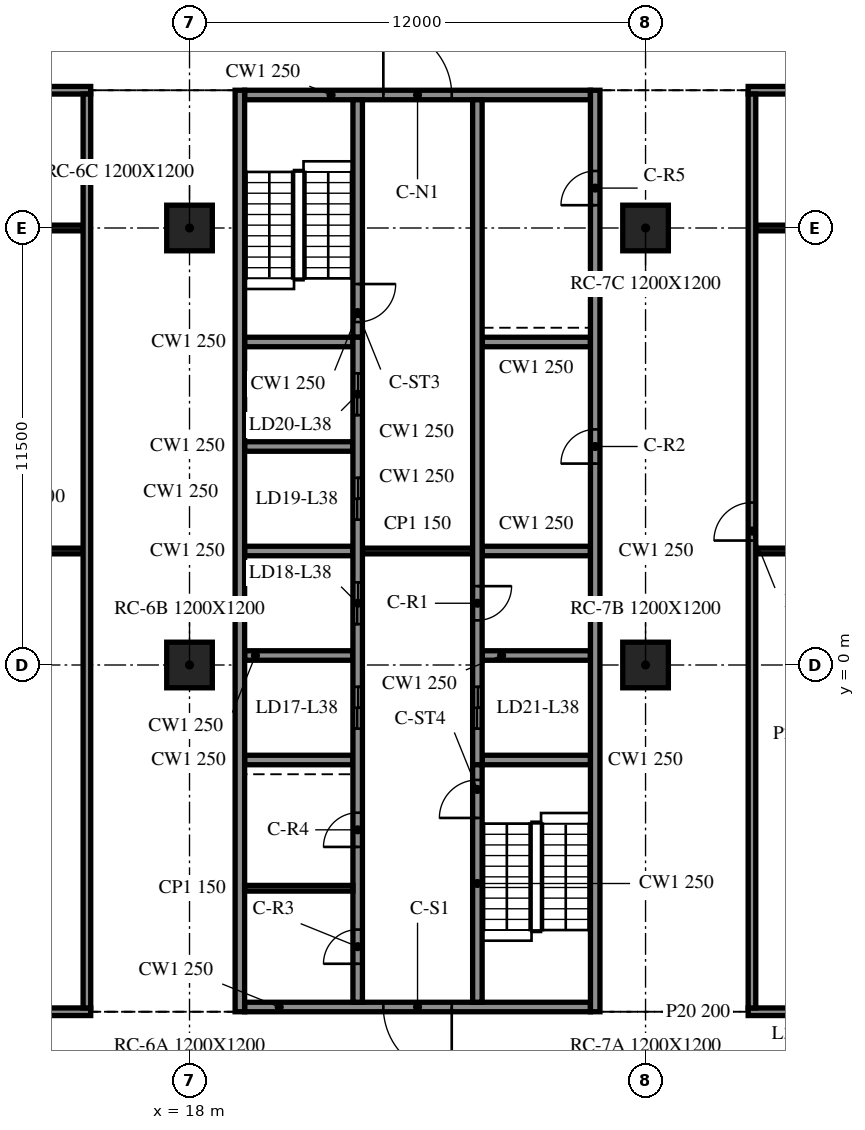
"""IFC4 building model, lengths in metres.
Left out: names, types, materials, properties, quantities, classifications, styles, units other than length and angle.
Written with IfcOpenShell. Run it as: python <this file> out.ifc"""

import sys

from ifc_helpers import new_model, si_unit, direction, frame, frame_2d, origin, origin_2d, place, context, subcontext, project, spatial, rectangle, extrude, element, fill, save


model = new_model("IFC4")
c1 = context("Model", 3, precision=1e-05, world=origin(), true_north=direction((0.0, 1.0)))
c2 = subcontext(c1, "Body", "Model", "MODEL_VIEW")
j1 = project(units=[si_unit("LENGTHUNIT", "METRE"), si_unit("PLANEANGLEUNIT", "RADIAN")], contexts=[c1])
p1 = place(None, origin())
s1 = spatial("IfcSite", under=j1, at=p1, CompositionType="ELEMENT")
p2 = place(p1, origin())
s2 = spatial("IfcBuilding", under=s1, at=p2, CompositionType="ELEMENT")
p3 = place(p2, frame((0.0, 0.0, 163.0)))
s3 = spatial("IfcBuildingStorey", under=s2, at=p3, CompositionType="ELEMENT", Elevation=163.0)
for number, where, z_axis, x_axis in (
    (1, (18.0, 0.0, -0.34), (0.0, 0.0, 1.0), (1.0, 0.0, 0.0)),
    (2, (18.0, 11.5, -0.34), (0.0, 0.0, 1.0), (1.0, 0.0, 0.0)),
    (3, (30.0, 0.0, -0.34), (0.0, 0.0, 1.0), (1.0, 0.0, 0.0)),
    (4, (30.0, 11.5, -0.34), (0.0, 0.0, 1.0), (1.0, 0.0, 0.0)),
):
    element("IfcColumn", number, at=place(p3, frame(where, z_axis=z_axis, x_axis=x_axis)), inside=s3, PredefinedType="COLUMN", context=c2, shape_type="SweptSolid", body=[
        extrude(rectangle(XDim=1.2, YDim=1.2, at=origin_2d()), origin(), (0.0, 0.0, 1.0), 3.8),
    ])
p4 = place(p3, frame((19.325, 15.125, 0.0), z_axis=(0.0, 0.0, 1.0), x_axis=(0.0, -1.0, 0.0)))
e5 = element("IfcWall", 5, at=p4, inside=s3, PredefinedType="SOLIDWALL", context=c2, shape_type="SweptSolid", body=[
    extrude(rectangle(XDim=24.25, YDim=0.25, at=frame_2d((12.125, 0.0))), origin(), (0.0, 0.0, 1.0), 3.46),
])
p5 = place(p3, frame((28.675, -9.125, 0.0), z_axis=(0.0, 0.0, 1.0), x_axis=(0.0, 1.0, 0.0)))
e6 = element("IfcWall", 6, at=p5, inside=s3, PredefinedType="SOLIDWALL", context=c2, shape_type="SweptSolid", body=[
    extrude(rectangle(XDim=24.25, YDim=0.25, at=frame_2d((12.125, 0.0))), origin(), (0.0, 0.0, 1.0), 3.46),
])
p6 = place(p5, frame((14.425, 0.0, 0.0)))
e7 = element("IfcOpeningElement", 7, at=p6, cuts=e6, PredefinedType="OPENING", context=c2, shape_type="SweptSolid", body=[
    extrude(rectangle(XDim=0.9, YDim=2.1, at=frame_2d((0.45, 1.05))), frame((0.0, 0.135, 0.0), z_axis=(0.0, -1.0, 0.0), x_axis=(1.0, 0.0, 0.0)), (0.0, 0.0, 1.0), 0.27),
])
p7 = place(p5, frame((21.225, 0.0, 0.0)))
e8 = element("IfcOpeningElement", 8, at=p7, cuts=e6, PredefinedType="OPENING", context=c2, shape_type="SweptSolid", body=[
    extrude(rectangle(XDim=0.9, YDim=2.1, at=frame_2d((0.45, 1.05))), frame((0.0, 0.135, 0.0), z_axis=(0.0, -1.0, 0.0), x_axis=(1.0, 0.0, 0.0)), (0.0, 0.0, 1.0), 0.27),
])
p8 = place(p3, frame((28.55, -9.0, 0.0), z_axis=(0.0, 0.0, 1.0), x_axis=(-1.0, 0.0, 0.0)))
e9 = element("IfcWall", 9, at=p8, inside=s3, PredefinedType="SOLIDWALL", context=c2, shape_type="SweptSolid", body=[
    extrude(rectangle(XDim=9.1, YDim=0.25, at=frame_2d((4.55, 0.0))), origin(), (0.0, 0.0, 1.0), 3.46),
])
p9 = place(p8, frame((3.65, 0.0, 0.0)))
e10 = element("IfcOpeningElement", 10, at=p9, cuts=e9, PredefinedType="OPENING", context=c2, shape_type="SweptSolid", body=[
    extrude(rectangle(XDim=1.8, YDim=2.1, at=frame_2d((0.9, 1.05))), frame((0.0, 0.135, 0.0), z_axis=(0.0, -1.0, 0.0), x_axis=(1.0, 0.0, 0.0)), (0.0, 0.0, 1.0), 0.27),
])
p10 = place(p3, frame((19.45, 15.0, 0.0), z_axis=(0.0, 0.0, 1.0), x_axis=(1.0, 0.0, 0.0)))
e11 = element("IfcWall", 11, at=p10, inside=s3, PredefinedType="SOLIDWALL", context=c2, shape_type="SweptSolid", body=[
    extrude(rectangle(XDim=9.1, YDim=0.25, at=frame_2d((4.55, 0.0))), origin(), (0.0, 0.0, 1.0), 3.46),
])
p11 = place(p10, frame((3.65, 0.0, 0.0)))
e12 = element("IfcOpeningElement", 12, at=p11, cuts=e11, PredefinedType="OPENING", context=c2, shape_type="SweptSolid", body=[
    extrude(rectangle(XDim=1.8, YDim=2.1, at=frame_2d((0.9, 1.05))), frame((0.0, 0.135, 0.0), z_axis=(0.0, -1.0, 0.0), x_axis=(1.0, 0.0, 0.0)), (0.0, 0.0, 1.0), 0.27),
])
p12 = place(p3, frame((22.425, -8.875, 0.0), z_axis=(0.0, 0.0, 1.0), x_axis=(0.0, 1.0, 0.0)))
e13 = element("IfcWall", 13, at=p12, inside=s3, PredefinedType="SOLIDWALL", context=c2, shape_type="SweptSolid", body=[
    extrude(rectangle(XDim=17.5, YDim=0.25, at=frame_2d((8.75, 0.0))), origin(), (0.0, 0.0, 1.0), 3.46),
])
p13 = place(p12, frame((7.2, 0.0, 0.0)))
e14 = element("IfcOpeningElement", 14, at=p13, cuts=e13, PredefinedType="OPENING", context=c2, shape_type="SweptSolid", body=[
    extrude(rectangle(XDim=1.1, YDim=2.1, at=frame_2d((0.55, 1.05))), frame((0.0, 0.135, 0.0), z_axis=(0.0, -1.0, 0.0), x_axis=(1.0, 0.0, 0.0)), (0.0, 0.0, 1.0), 0.27),
])
p14 = place(p12, frame((9.95, 0.0, 0.0)))
e15 = element("IfcOpeningElement", 15, at=p14, cuts=e13, PredefinedType="OPENING", context=c2, shape_type="SweptSolid", body=[
    extrude(rectangle(XDim=1.1, YDim=2.1, at=frame_2d((0.55, 1.05))), frame((0.0, 0.135, 0.0), z_axis=(0.0, -1.0, 0.0), x_axis=(1.0, 0.0, 0.0)), (0.0, 0.0, 1.0), 0.27),
])
p15 = place(p12, frame((12.7, 0.0, 0.0)))
e16 = element("IfcOpeningElement", 16, at=p15, cuts=e13, PredefinedType="OPENING", context=c2, shape_type="SweptSolid", body=[
    extrude(rectangle(XDim=1.1, YDim=2.1, at=frame_2d((0.55, 1.05))), frame((0.0, 0.135, 0.0), z_axis=(0.0, -1.0, 0.0), x_axis=(1.0, 0.0, 0.0)), (0.0, 0.0, 1.0), 0.27),
])
p16 = place(p12, frame((15.45, 0.0, 0.0)))
e17 = element("IfcOpeningElement", 17, at=p16, cuts=e13, PredefinedType="OPENING", context=c2, shape_type="SweptSolid", body=[
    extrude(rectangle(XDim=1.1, YDim=2.1, at=frame_2d((0.55, 1.05))), frame((0.0, 0.135, 0.0), z_axis=(0.0, -1.0, 0.0), x_axis=(1.0, 0.0, 0.0)), (0.0, 0.0, 1.0), 0.27),
])
p17 = place(p12, frame((1.012, 0.0, 0.0)))
e18 = element("IfcOpeningElement", 18, at=p17, cuts=e13, PredefinedType="OPENING", context=c2, shape_type="SweptSolid", body=[
    extrude(rectangle(XDim=0.9, YDim=2.1, at=frame_2d((0.45, 1.05))), frame((0.0, 0.135, 0.0), z_axis=(0.0, -1.0, 0.0), x_axis=(1.0, 0.0, 0.0)), (0.0, 0.0, 1.0), 0.27),
])
p18 = place(p12, frame((4.087, 0.0, 0.0)))
e19 = element("IfcOpeningElement", 19, at=p18, cuts=e13, PredefinedType="OPENING", context=c2, shape_type="SweptSolid", body=[
    extrude(rectangle(XDim=0.9, YDim=2.1, at=frame_2d((0.45, 1.05))), frame((0.0, 0.135, 0.0), z_axis=(0.0, -1.0, 0.0), x_axis=(1.0, 0.0, 0.0)), (0.0, 0.0, 1.0), 0.27),
])
p19 = place(p3, frame((22.425, 14.875, 0.0), z_axis=(0.0, 0.0, 1.0), x_axis=(0.0, -1.0, 0.0)))
e20 = element("IfcWall", 20, at=p19, inside=s3, PredefinedType="SOLIDWALL", context=c2, shape_type="SweptSolid", body=[
    extrude(rectangle(XDim=6.25, YDim=0.25, at=frame_2d((3.125, 0.0))), origin(), (0.0, 0.0, 1.0), 3.46),
])
p20 = place(p19, frame((4.85, 0.0, 0.0)))
e21 = element("IfcOpeningElement", 21, at=p20, cuts=e20, PredefinedType="OPENING", context=c2, shape_type="SweptSolid", body=[
    extrude(rectangle(XDim=1.0, YDim=2.1, at=frame_2d((0.5, 1.05))), frame((0.0, 0.135, 0.0), z_axis=(0.0, -1.0, 0.0), x_axis=(1.0, 0.0, 0.0)), (0.0, 0.0, 1.0), 0.27),
])
p21 = place(p3, frame((25.575, -8.875, 0.0), z_axis=(0.0, 0.0, 1.0), x_axis=(0.0, 1.0, 0.0)))
e22 = element("IfcWall", 22, at=p21, inside=s3, PredefinedType="SOLIDWALL", context=c2, shape_type="SweptSolid", body=[
    extrude(rectangle(XDim=6.25, YDim=0.25, at=frame_2d((3.125, 0.0))), origin(), (0.0, 0.0, 1.0), 3.46),
])
p22 = place(p21, frame((4.85, 0.0, 0.0)))
e23 = element("IfcOpeningElement", 23, at=p22, cuts=e22, PredefinedType="OPENING", context=c2, shape_type="SweptSolid", body=[
    extrude(rectangle(XDim=1.0, YDim=2.1, at=frame_2d((0.5, 1.05))), frame((0.0, 0.135, 0.0), z_axis=(0.0, -1.0, 0.0), x_axis=(1.0, 0.0, 0.0)), (0.0, 0.0, 1.0), 0.27),
])
p23 = place(p3, frame((25.575, 14.875, 0.0), z_axis=(0.0, 0.0, 1.0), x_axis=(0.0, -1.0, 0.0)))
e24 = element("IfcWall", 24, at=p23, inside=s3, PredefinedType="SOLIDWALL", context=c2, shape_type="SweptSolid", body=[
    extrude(rectangle(XDim=17.5, YDim=0.25, at=frame_2d((8.75, 0.0))), origin(), (0.0, 0.0, 1.0), 3.46),
])
p24 = place(p23, frame((15.45, 0.0, 0.0)))
e25 = element("IfcOpeningElement", 25, at=p24, cuts=e24, PredefinedType="OPENING", context=c2, shape_type="SweptSolid", body=[
    extrude(rectangle(XDim=1.1, YDim=2.1, at=frame_2d((0.55, 1.05))), frame((0.0, 0.135, 0.0), z_axis=(0.0, -1.0, 0.0), x_axis=(1.0, 0.0, 0.0)), (0.0, 0.0, 1.0), 0.27),
])
p25 = place(p23, frame((12.8, 0.0, 0.0)))
e26 = element("IfcOpeningElement", 26, at=p25, cuts=e24, PredefinedType="OPENING", context=c2, shape_type="SweptSolid", body=[
    extrude(rectangle(XDim=0.9, YDim=2.1, at=frame_2d((0.45, 1.05))), frame((0.0, 0.135, 0.0), z_axis=(0.0, -1.0, 0.0), x_axis=(1.0, 0.0, 0.0)), (0.0, 0.0, 1.0), 0.27),
])
for number, where, z_axis, x_axis in (
    (27, (19.45, -2.5, 0.0), (0.0, 0.0, 1.0), (1.0, 0.0, 0.0)),
    (28, (19.45, 0.25, 0.0), (0.0, 0.0, 1.0), (1.0, 0.0, 0.0)),
    (29, (19.45, 3.0, 0.0), (0.0, 0.0, 1.0), (1.0, 0.0, 0.0)),
    (30, (19.45, 5.75, 0.0), (0.0, 0.0, 1.0), (1.0, 0.0, 0.0)),
    (31, (19.45, 8.5, 0.0), (0.0, 0.0, 1.0), (1.0, 0.0, 0.0)),
    (32, (25.7, -2.5, 0.0), (0.0, 0.0, 1.0), (1.0, 0.0, 0.0)),
    (33, (25.7, 0.25, 0.0), (0.0, 0.0, 1.0), (1.0, 0.0, 0.0)),
    (34, (25.7, 3.0, 0.0), (0.0, 0.0, 1.0), (1.0, 0.0, 0.0)),
    (35, (25.7, 8.5, 0.0), (0.0, 0.0, 1.0), (1.0, 0.0, 0.0)),
):
    element("IfcWall", number, at=place(p3, frame(where, z_axis=z_axis, x_axis=x_axis)), inside=s3, PredefinedType="SOLIDWALL", context=c2, shape_type="SweptSolid", body=[
        extrude(rectangle(XDim=2.85, YDim=0.25, at=frame_2d((1.425, 0.0))), origin(), (0.0, 0.0, 1.0), 3.46),
    ])
p26 = place(p3, frame((22.55, 3.0, 0.0), z_axis=(0.0, 0.0, 1.0), x_axis=(1.0, 0.0, 0.0)))
e36 = element("IfcWall", 36, at=p26, inside=s3, PredefinedType="PARTITIONING", context=c2, shape_type="SweptSolid", body=[
    extrude(rectangle(XDim=2.9, YDim=0.15, at=frame_2d((1.45, 0.0))), origin(), (0.0, 0.0, 1.0), 3.46),
])
p27 = place(p3, frame((19.45, -5.875, 0.0), z_axis=(0.0, 0.0, 1.0), x_axis=(1.0, 0.0, 0.0)))
e37 = element("IfcWall", 37, at=p27, inside=s3, PredefinedType="PARTITIONING", context=c2, shape_type="SweptSolid", body=[
    extrude(rectangle(XDim=2.85, YDim=0.15, at=frame_2d((1.425, 0.0))), origin(), (0.0, 0.0, 1.0), 3.46),
])
p28 = place(p3, frame((8.5, -9.125, 0.0), z_axis=(0.0, 0.0, 1.0), x_axis=(1.0, 0.0, 0.0)))
e38 = element("IfcWall", 38, at=p28, inside=s3, PredefinedType="PARTITIONING", context=c2, shape_type="SweptSolid", body=[
    extrude(rectangle(XDim=6.9, YDim=0.2, at=frame_2d((3.45, 0.0))), origin(), (0.0, 0.0, 1.0), 3.46),
])
p29 = place(p28, frame((2.9, 0.0, 0.0)))
e39 = element("IfcOpeningElement", 39, at=p29, cuts=e38, PredefinedType="OPENING", context=c2, shape_type="SweptSolid", body=[
    extrude(rectangle(XDim=0.9, YDim=2.1, at=frame_2d((0.45, 1.05))), frame((0.0, 0.11, 0.0), z_axis=(0.0, -1.0, 0.0), x_axis=(1.0, 0.0, 0.0)), (0.0, 0.0, 1.0), 0.22),
])
p30 = place(p3, frame((32.7, -9.125, 0.0), z_axis=(0.0, 0.0, 1.0), x_axis=(1.0, 0.0, 0.0)))
e40 = element("IfcWall", 40, at=p30, inside=s3, PredefinedType="PARTITIONING", context=c2, shape_type="SweptSolid", body=[
    extrude(rectangle(XDim=15.275, YDim=0.2, at=frame_2d((7.638, 0.0))), origin(), (0.0, 0.0, 1.0), 3.46),
])
p31 = place(p30, frame((6.9, 0.0, 0.0)))
e41 = element("IfcOpeningElement", 41, at=p31, cuts=e40, PredefinedType="OPENING", context=c2, shape_type="SweptSolid", body=[
    extrude(rectangle(XDim=1.2, YDim=2.1, at=frame_2d((0.6, 1.05))), frame((0.0, 0.11, 0.0), z_axis=(0.0, -1.0, 0.0), x_axis=(1.0, 0.0, 0.0)), (0.0, 0.0, 1.0), 0.22),
])
p32 = place(p3, frame((8.7, 3.0, 0.0), z_axis=(0.0, 0.0, 1.0), x_axis=(1.0, 0.0, 0.0)))
e42 = element("IfcWall", 42, at=p32, inside=s3, PredefinedType="PARTITIONING", context=c2, shape_type="SweptSolid", body=[
    extrude(rectangle(XDim=6.5, YDim=0.15, at=frame_2d((3.25, 0.0))), origin(), (0.0, 0.0, 1.0), 3.46),
])
p33 = place(p3, frame((32.9, 3.0, 0.0), z_axis=(0.0, 0.0, 1.0), x_axis=(1.0, 0.0, 0.0)))
e43 = element("IfcWall", 43, at=p33, inside=s3, PredefinedType="PARTITIONING", context=c2, shape_type="SweptSolid", body=[
    extrude(rectangle(XDim=15.075, YDim=0.15, at=frame_2d((7.538, 0.0))), origin(), (0.0, 0.0, 1.0), 3.46),
])
p34 = place(p3, frame((8.7, 11.5, 0.0), z_axis=(0.0, 0.0, 1.0), x_axis=(1.0, 0.0, 0.0)))
e44 = element("IfcWall", 44, at=p34, inside=s3, PredefinedType="PARTITIONING", context=c2, shape_type="SweptSolid", body=[
    extrude(rectangle(XDim=6.5, YDim=0.15, at=frame_2d((3.25, 0.0))), origin(), (0.0, 0.0, 1.0), 3.46),
])
p35 = place(p3, frame((32.9, 11.5, 0.0), z_axis=(0.0, 0.0, 1.0), x_axis=(1.0, 0.0, 0.0)))
e45 = element("IfcWall", 45, at=p35, inside=s3, PredefinedType="PARTITIONING", context=c2, shape_type="SweptSolid", body=[
    extrude(rectangle(XDim=8.5, YDim=0.15, at=frame_2d((4.25, 0.0))), origin(), (0.0, 0.0, 1.0), 3.46),
])
p36 = place(p3, frame((8.5, 15.125, 0.0), z_axis=(0.0, 0.0, 1.0), x_axis=(1.0, 0.0, 0.0)))
e46 = element("IfcWall", 46, at=p36, inside=s3, PredefinedType="PARTITIONING", context=c2, shape_type="SweptSolid", body=[
    extrude(rectangle(XDim=6.9, YDim=0.2, at=frame_2d((3.45, 0.0))), origin(), (0.0, 0.0, 1.0), 3.46),
])
p37 = place(p36, frame((2.9, 0.0, 0.0)))
e47 = element("IfcOpeningElement", 47, at=p37, cuts=e46, PredefinedType="OPENING", context=c2, shape_type="SweptSolid", body=[
    extrude(rectangle(XDim=0.9, YDim=2.1, at=frame_2d((0.45, 1.05))), frame((0.0, 0.11, 0.0), z_axis=(0.0, -1.0, 0.0), x_axis=(1.0, 0.0, 0.0)), (0.0, 0.0, 1.0), 0.22),
])
p38 = place(p3, frame((32.7, 15.125, 0.0), z_axis=(0.0, 0.0, 1.0), x_axis=(1.0, 0.0, 0.0)))
e48 = element("IfcWall", 48, at=p38, inside=s3, PredefinedType="PARTITIONING", context=c2, shape_type="SweptSolid", body=[
    extrude(rectangle(XDim=15.275, YDim=0.2, at=frame_2d((7.638, 0.0))), origin(), (0.0, 0.0, 1.0), 3.46),
])
p39 = place(p38, frame((7.1, 0.0, 0.0)))
e49 = element("IfcOpeningElement", 49, at=p39, cuts=e48, PredefinedType="OPENING", context=c2, shape_type="SweptSolid", body=[
    extrude(rectangle(XDim=1.0, YDim=2.1, at=frame_2d((0.5, 1.05))), frame((0.0, 0.11, 0.0), z_axis=(0.0, -1.0, 0.0), x_axis=(1.0, 0.0, 0.0)), (0.0, 0.0, 1.0), 0.22),
])
p40 = place(p3, frame((15.3, -9.025, 0.0), z_axis=(0.0, 0.0, 1.0), x_axis=(0.0, 1.0, 0.0)))
e50 = element("IfcWall", 50, at=p40, inside=s3, PredefinedType="PARTITIONING", context=c2, shape_type="SweptSolid", body=[
    extrude(rectangle(XDim=24.05, YDim=0.2, at=frame_2d((12.025, 0.0))), origin(), (0.0, 0.0, 1.0), 3.46),
])
p41 = place(p3, frame((32.8, -9.025, 0.0), z_axis=(0.0, 0.0, 1.0), x_axis=(0.0, 1.0, 0.0)))
e51 = element("IfcWall", 51, at=p41, inside=s3, PredefinedType="PARTITIONING", context=c2, shape_type="SweptSolid", body=[
    extrude(rectangle(XDim=24.05, YDim=0.2, at=frame_2d((12.025, 0.0))), origin(), (0.0, 0.0, 1.0), 3.46),
])
p42 = place(p41, frame((12.3, 0.0, 0.0)))
e52 = element("IfcOpeningElement", 52, at=p42, cuts=e51, PredefinedType="OPENING", context=c2, shape_type="SweptSolid", body=[
    extrude(rectangle(XDim=1.0, YDim=2.1, at=frame_2d((0.5, 1.05))), frame((0.0, 0.11, 0.0), z_axis=(0.0, -1.0, 0.0), x_axis=(1.0, 0.0, 0.0)), (0.0, 0.0, 1.0), 0.22),
])
p43 = place(p9, origin())
e53 = element("IfcDoor", 53, at=p43, inside=s3, OperationType="DOUBLE_DOOR_SINGLE_SWING", PredefinedType="DOOR", context=c2, shape_type="SweptSolid", body=[
    extrude(rectangle(XDim=1.8, YDim=2.1, at=frame_2d((0.9, 1.05))), frame((0.0, 0.025, 0.0), z_axis=(0.0, -1.0, 0.0), x_axis=(1.0, 0.0, 0.0)), (0.0, 0.0, 1.0), 0.05),
])
fill(e10, e53)
p44 = place(p11, origin())
e54 = element("IfcDoor", 54, at=p44, inside=s3, OperationType="DOUBLE_DOOR_SINGLE_SWING", PredefinedType="DOOR", context=c2, shape_type="SweptSolid", body=[
    extrude(rectangle(XDim=1.8, YDim=2.1, at=frame_2d((0.9, 1.05))), frame((0.0, 0.025, 0.0), z_axis=(0.0, -1.0, 0.0), x_axis=(1.0, 0.0, 0.0)), (0.0, 0.0, 1.0), 0.05),
])
fill(e12, e54)
p45 = place(p24, origin())
e55 = element("IfcDoor", 55, at=p45, inside=s3, OperationType="DOUBLE_DOOR_SLIDING", PredefinedType="DOOR", context=c2, shape_type="SweptSolid", body=[
    extrude(rectangle(XDim=1.1, YDim=2.1, at=frame_2d((0.55, 1.05))), frame((0.0, 0.025, 0.0), z_axis=(0.0, -1.0, 0.0), x_axis=(1.0, 0.0, 0.0)), (0.0, 0.0, 1.0), 0.05),
])
fill(e25, e55)
p46 = place(p13, origin())
e56 = element("IfcDoor", 56, at=p46, inside=s3, OperationType="DOUBLE_DOOR_SLIDING", PredefinedType="DOOR", context=c2, shape_type="SweptSolid", body=[
    extrude(rectangle(XDim=1.1, YDim=2.1, at=frame_2d((0.55, 1.05))), frame((0.0, 0.025, 0.0), z_axis=(0.0, -1.0, 0.0), x_axis=(1.0, 0.0, 0.0)), (0.0, 0.0, 1.0), 0.05),
])
fill(e14, e56)
p47 = place(p14, origin())
e57 = element("IfcDoor", 57, at=p47, inside=s3, OperationType="DOUBLE_DOOR_SLIDING", PredefinedType="DOOR", context=c2, shape_type="SweptSolid", body=[
    extrude(rectangle(XDim=1.1, YDim=2.1, at=frame_2d((0.55, 1.05))), frame((0.0, 0.025, 0.0), z_axis=(0.0, -1.0, 0.0), x_axis=(1.0, 0.0, 0.0)), (0.0, 0.0, 1.0), 0.05),
])
fill(e15, e57)
p48 = place(p15, origin())
e58 = element("IfcDoor", 58, at=p48, inside=s3, OperationType="DOUBLE_DOOR_SLIDING", PredefinedType="DOOR", context=c2, shape_type="SweptSolid", body=[
    extrude(rectangle(XDim=1.1, YDim=2.1, at=frame_2d((0.55, 1.05))), frame((0.0, 0.025, 0.0), z_axis=(0.0, -1.0, 0.0), x_axis=(1.0, 0.0, 0.0)), (0.0, 0.0, 1.0), 0.05),
])
fill(e16, e58)
p49 = place(p16, origin())
e59 = element("IfcDoor", 59, at=p49, inside=s3, OperationType="DOUBLE_DOOR_SLIDING", PredefinedType="DOOR", context=c2, shape_type="SweptSolid", body=[
    extrude(rectangle(XDim=1.1, YDim=2.1, at=frame_2d((0.55, 1.05))), frame((0.0, 0.025, 0.0), z_axis=(0.0, -1.0, 0.0), x_axis=(1.0, 0.0, 0.0)), (0.0, 0.0, 1.0), 0.05),
])
fill(e17, e59)
p50 = place(p25, origin())
e60 = element("IfcDoor", 60, at=p50, inside=s3, OperationType="SINGLE_SWING_LEFT", PredefinedType="DOOR", context=c2, shape_type="SweptSolid", body=[
    extrude(rectangle(XDim=0.9, YDim=2.1, at=frame_2d((0.45, 1.05))), frame((0.0, 0.025, 0.0), z_axis=(0.0, -1.0, 0.0), x_axis=(1.0, 0.0, 0.0)), (0.0, 0.0, 1.0), 0.05),
])
fill(e26, e60)
p51 = place(p6, origin())
e61 = element("IfcDoor", 61, at=p51, inside=s3, OperationType="SINGLE_SWING_RIGHT", PredefinedType="DOOR", context=c2, shape_type="SweptSolid", body=[
    extrude(rectangle(XDim=0.9, YDim=2.1, at=frame_2d((0.45, 1.05))), frame((0.0, 0.025, 0.0), z_axis=(0.0, -1.0, 0.0), x_axis=(1.0, 0.0, 0.0)), (0.0, 0.0, 1.0), 0.05),
])
fill(e7, e61)
p52 = place(p17, origin())
e62 = element("IfcDoor", 62, at=p52, inside=s3, OperationType="SINGLE_SWING_LEFT", PredefinedType="DOOR", context=c2, shape_type="SweptSolid", body=[
    extrude(rectangle(XDim=0.9, YDim=2.1, at=frame_2d((0.45, 1.05))), frame((0.0, 0.025, 0.0), z_axis=(0.0, -1.0, 0.0), x_axis=(1.0, 0.0, 0.0)), (0.0, 0.0, 1.0), 0.05),
])
fill(e18, e62)
p53 = place(p18, origin())
e63 = element("IfcDoor", 63, at=p53, inside=s3, OperationType="SINGLE_SWING_RIGHT", PredefinedType="DOOR", context=c2, shape_type="SweptSolid", body=[
    extrude(rectangle(XDim=0.9, YDim=2.1, at=frame_2d((0.45, 1.05))), frame((0.0, 0.025, 0.0), z_axis=(0.0, -1.0, 0.0), x_axis=(1.0, 0.0, 0.0)), (0.0, 0.0, 1.0), 0.05),
])
fill(e19, e63)
p54 = place(p7, origin())
e64 = element("IfcDoor", 64, at=p54, inside=s3, OperationType="SINGLE_SWING_LEFT", PredefinedType="DOOR", context=c2, shape_type="SweptSolid", body=[
    extrude(rectangle(XDim=0.9, YDim=2.1, at=frame_2d((0.45, 1.05))), frame((0.0, 0.025, 0.0), z_axis=(0.0, -1.0, 0.0), x_axis=(1.0, 0.0, 0.0)), (0.0, 0.0, 1.0), 0.05),
])
fill(e8, e64)
p55 = place(p20, origin())
e65 = element("IfcDoor", 65, at=p55, inside=s3, OperationType="SINGLE_SWING_RIGHT", PredefinedType="DOOR", context=c2, shape_type="SweptSolid", body=[
    extrude(rectangle(XDim=1.0, YDim=2.1, at=frame_2d((0.5, 1.05))), frame((0.0, 0.025, 0.0), z_axis=(0.0, -1.0, 0.0), x_axis=(1.0, 0.0, 0.0)), (0.0, 0.0, 1.0), 0.05),
])
fill(e21, e65)
p56 = place(p22, origin())
e66 = element("IfcDoor", 66, at=p56, inside=s3, OperationType="SINGLE_SWING_LEFT", PredefinedType="DOOR", context=c2, shape_type="SweptSolid", body=[
    extrude(rectangle(XDim=1.0, YDim=2.1, at=frame_2d((0.5, 1.05))), frame((0.0, 0.025, 0.0), z_axis=(0.0, -1.0, 0.0), x_axis=(1.0, 0.0, 0.0)), (0.0, 0.0, 1.0), 0.05),
])
fill(e23, e66)
p57 = place(p42, origin())
e67 = element("IfcDoor", 67, at=p57, inside=s3, OperationType="SINGLE_SWING_LEFT", PredefinedType="DOOR", context=c2, shape_type="SweptSolid", body=[
    extrude(rectangle(XDim=1.0, YDim=2.1, at=frame_2d((0.5, 1.05))), frame((0.0, 0.025, 0.0), z_axis=(0.0, -1.0, 0.0), x_axis=(1.0, 0.0, 0.0)), (0.0, 0.0, 1.0), 0.05),
])
fill(e52, e67)
save(model, sys.argv[1])
